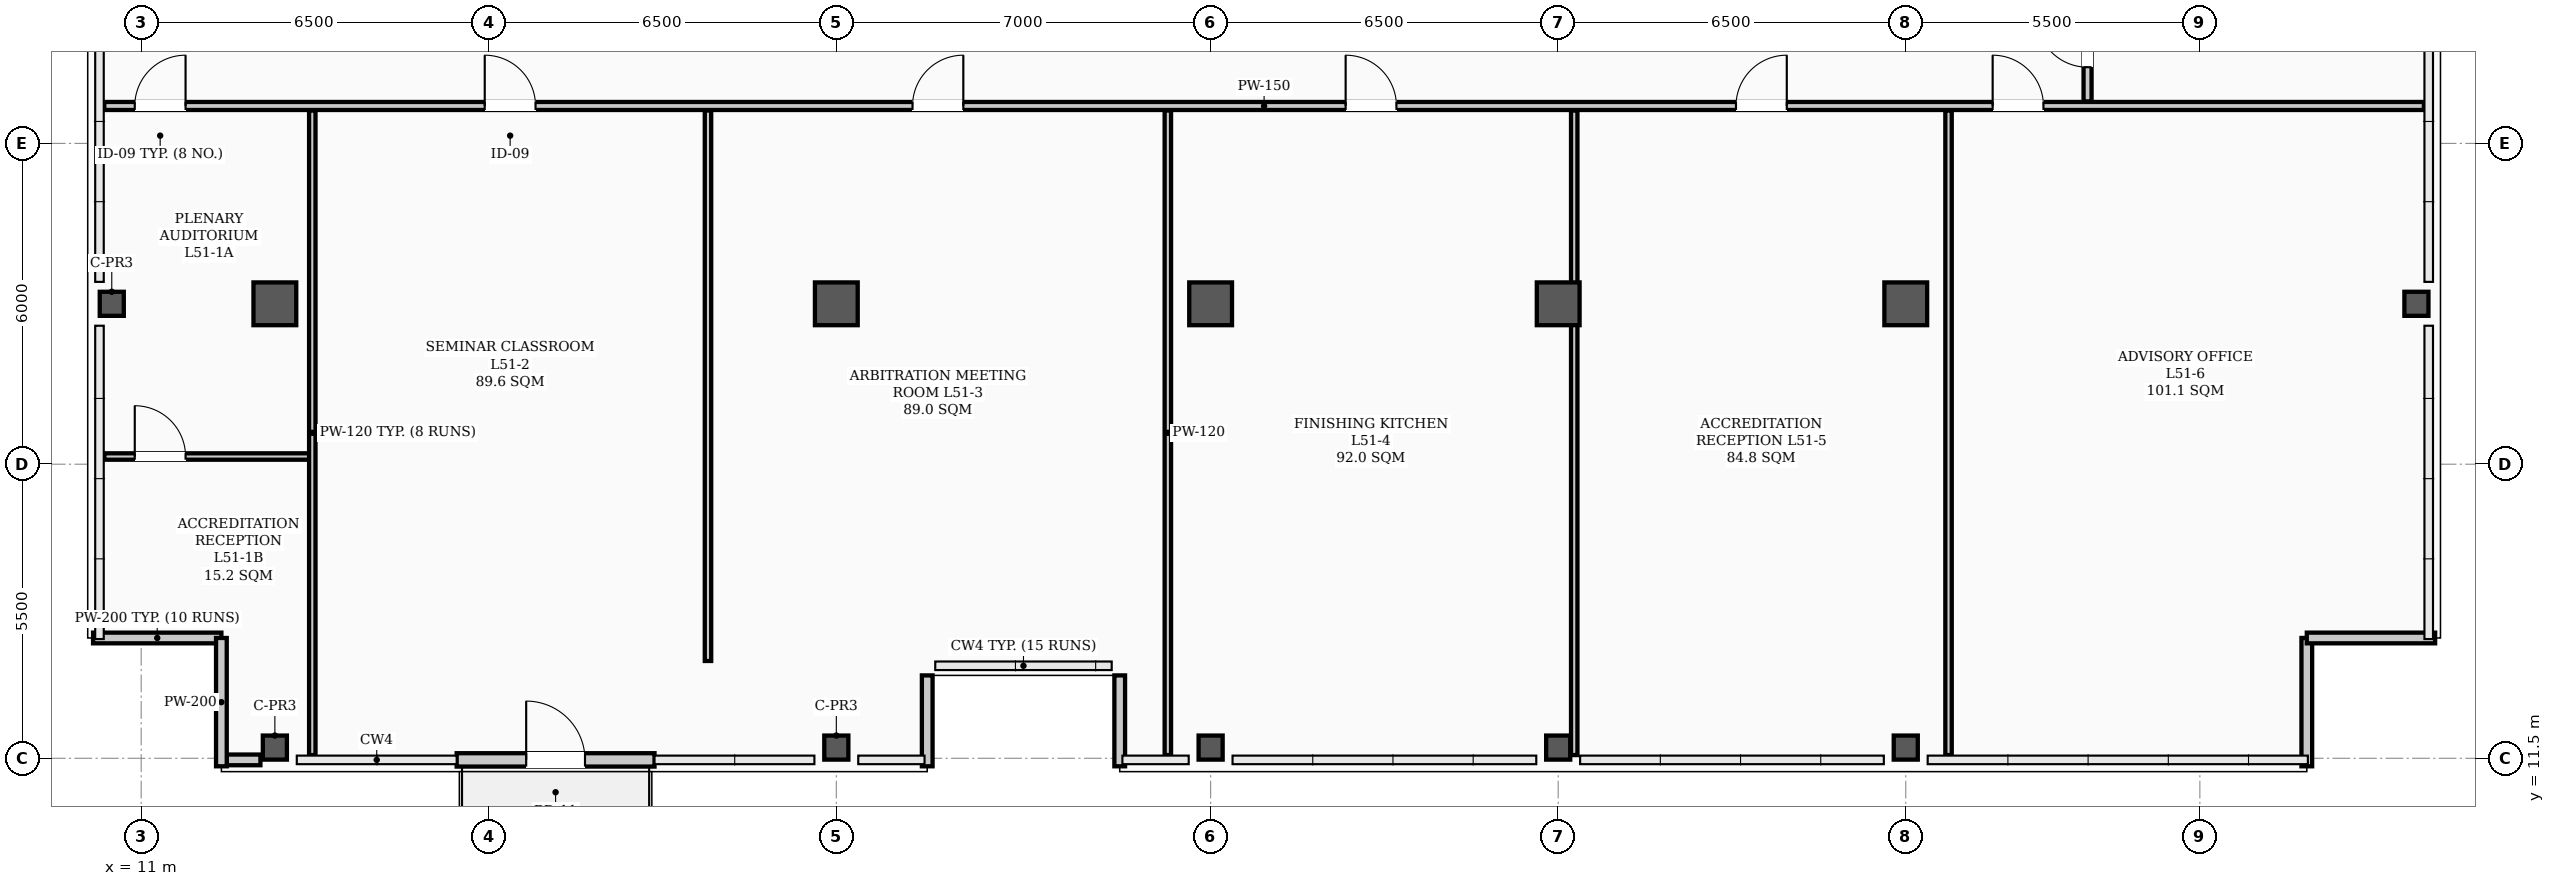
"""IFC4 building model, lengths in metres.
Left out: names, types, materials, properties, quantities, classifications, styles, units other than length and angle.
Written with IfcOpenShell. Run it as: python <this file> out.ifc"""

import sys

from ifc_helpers import new_model, si_unit, direction, frame, frame_2d, origin, origin_2d, place, context, subcontext, project, spatial, rectangle, hollow_rectangle, extrude, element, fill, save


model = new_model("IFC4")
c1 = context("Model", 3, precision=1e-05, world=origin(), true_north=direction((0.0, 1.0)))
c2 = subcontext(c1, "Body", "Model", "MODEL_VIEW")
j1 = project(units=[si_unit("LENGTHUNIT", "METRE"), si_unit("PLANEANGLEUNIT", "RADIAN")], contexts=[c1])
p1 = place(None, origin())
s1 = spatial("IfcSite", under=j1, at=p1, CompositionType="ELEMENT")
p2 = place(p1, origin())
s2 = spatial("IfcBuilding", under=s1, at=p2, CompositionType="ELEMENT")
p3 = place(p2, frame((0.0, 0.0, 206.1)))
s3 = spatial("IfcBuildingStorey", under=s2, at=p3, CompositionType="ELEMENT", Elevation=206.1)
for number, where, z_axis, x_axis in (
    (1, (13.5, 20.0, 0.0), (0.0, 0.0, 1.0), (1.0, 0.0, 0.0)),
    (2, (24.0, 20.0, 0.0), (0.0, 0.0, 1.0), (1.0, 0.0, 0.0)),
    (3, (31.0, 20.0, 0.0), (0.0, 0.0, 1.0), (1.0, 0.0, 0.0)),
    (4, (37.5, 20.0, 0.0), (0.0, 0.0, 1.0), (1.0, 0.0, 0.0)),
    (5, (44.0, 20.0, 0.0), (0.0, 0.0, 1.0), (1.0, 0.0, 0.0)),
):
    element("IfcColumn", number, at=place(p3, frame(where, z_axis=z_axis, x_axis=x_axis)), inside=s3, PredefinedType="COLUMN", context=c2, shape_type="SweptSolid", body=[
        extrude(hollow_rectangle(XDim=0.8, YDim=0.8, WallThickness=0.032, InnerFilletRadius=0.016, OuterFilletRadius=0.048, at=origin_2d()), origin(), (0.0, 0.0, 1.0), 5.0),
    ])
for number, where, z_axis, x_axis in (
    (6, (10.45, 20.0, 0.0), (0.0, 0.0, 1.0), (1.0, 0.0, 0.0)),
    (7, (13.5, 11.7, 0.0), (0.0, 0.0, 1.0), (1.0, 0.0, 0.0)),
    (8, (24.0, 11.7, 0.0), (0.0, 0.0, 1.0), (1.0, 0.0, 0.0)),
    (9, (31.0, 11.7, 0.0), (0.0, 0.0, 1.0), (1.0, 0.0, 0.0)),
    (10, (37.5, 11.7, 0.0), (0.0, 0.0, 1.0), (1.0, 0.0, 0.0)),
    (11, (44.0, 11.7, 0.0), (0.0, 0.0, 1.0), (1.0, 0.0, 0.0)),
    (12, (53.55, 20.0, 0.0), (0.0, 0.0, 1.0), (1.0, 0.0, 0.0)),
):
    element("IfcColumn", number, at=place(p3, frame(where, z_axis=z_axis, x_axis=x_axis)), inside=s3, PredefinedType="COLUMN", context=c2, shape_type="SweptSolid", body=[
        extrude(hollow_rectangle(XDim=0.45, YDim=0.45, WallThickness=0.022, InnerFilletRadius=0.022, OuterFilletRadius=0.044, at=origin_2d()), origin(), (0.0, 0.0, 1.0), 5.0),
    ])
p4 = place(p3, frame((12.6, 11.47, 0.0), z_axis=(0.0, 0.0, 1.0), x_axis=(1.0, 0.0, 0.0)))
e13 = element("IfcWall", 13, at=p4, inside=s3, PredefinedType="PARAPET", context=c2, shape_type="SweptSolid", body=[
    extrude(rectangle(XDim=0.63, YDim=0.2, at=frame_2d((0.315, 0.0))), origin(), (0.0, 0.0, 1.0), 1.2),
])
for number, where, z_axis, x_axis in (
    (14, (10.1, 13.75, 0.0), (0.0, 0.0, 1.0), (1.0, 0.0, 0.0)),
    (15, (12.5, 13.75, 0.0), (0.0, 0.0, 1.0), (0.0, -1.0, 0.0)),
    (16, (51.5, 11.35, 0.0), (0.0, 0.0, 1.0), (0.0, 1.0, 0.0)),
    (17, (51.5, 13.75, 0.0), (0.0, 0.0, 1.0), (1.0, 0.0, 0.0)),
):
    element("IfcWall", number, at=place(p3, frame(where, z_axis=z_axis, x_axis=x_axis)), inside=s3, PredefinedType="PARAPET", context=c2, shape_type="SweptSolid", body=[
        extrude(rectangle(XDim=2.4, YDim=0.2, at=frame_2d((1.2, 0.0))), origin(), (0.0, 0.0, 1.0), 1.2),
    ])
for number, where, z_axis, x_axis in (
    (18, (25.7, 11.35, 0.0), (0.0, 0.0, 1.0), (0.0, 1.0, 0.0)),
    (19, (29.3, 13.05, 0.0), (0.0, 0.0, 1.0), (0.0, -1.0, 0.0)),
):
    element("IfcWall", number, at=place(p3, frame(where, z_axis=z_axis, x_axis=x_axis)), inside=s3, PredefinedType="PARAPET", context=c2, shape_type="SweptSolid", body=[
        extrude(rectangle(XDim=1.7, YDim=0.2, at=frame_2d((0.85, 0.0))), origin(), (0.0, 0.0, 1.0), 1.2),
    ])
p5 = place(p3, frame((16.9, 11.47, 0.0), z_axis=(0.0, 0.0, 1.0), x_axis=(1.0, 0.0, 0.0)))
e20 = element("IfcWall", 20, at=p5, inside=s3, PredefinedType="STANDARD", context=c2, shape_type="SweptSolid", body=[
    extrude(rectangle(XDim=3.7, YDim=0.25, at=frame_2d((1.85, 0.0))), origin(), (0.0, 0.0, 1.0), 4.28),
])
p6 = place(p5, frame((1.3, 0.0, 0.0)))
e21 = element("IfcOpeningElement", 21, at=p6, cuts=e20, PredefinedType="OPENING", context=c2, shape_type="SweptSolid", body=[
    extrude(rectangle(XDim=1.1, YDim=2.2, at=frame_2d((0.55, 1.1))), frame((0.0, 0.135, 0.0), z_axis=(0.0, -1.0, 0.0), x_axis=(1.0, 0.0, 0.0)), (0.0, 0.0, 1.0), 0.27),
])
p7 = place(p3, frame((10.31, 23.7, 0.0), z_axis=(0.0, 0.0, 1.0), x_axis=(1.0, 0.0, 0.0)))
e22 = element("IfcWall", 22, at=p7, inside=s3, PredefinedType="PARTITIONING", context=c2, shape_type="SweptSolid", body=[
    extrude(rectangle(XDim=43.38, YDim=0.15, at=frame_2d((21.69, 0.0))), origin(), (0.0, 0.0, 1.0), 4.3),
])
p8 = place(p7, frame((0.57, 0.0, 0.0)))
e23 = element("IfcOpeningElement", 23, at=p8, cuts=e22, PredefinedType="OPENING", context=c2, shape_type="SweptSolid", body=[
    extrude(rectangle(XDim=0.95, YDim=2.08, at=frame_2d((0.475, 1.04))), frame((0.0, 0.085, 0.0), z_axis=(0.0, -1.0, 0.0), x_axis=(1.0, 0.0, 0.0)), (0.0, 0.0, 1.0), 0.17),
])
p9 = place(p7, frame((7.115, 0.0, 0.0)))
e24 = element("IfcOpeningElement", 24, at=p9, cuts=e22, PredefinedType="OPENING", context=c2, shape_type="SweptSolid", body=[
    extrude(rectangle(XDim=0.95, YDim=2.08, at=frame_2d((0.475, 1.04))), frame((0.0, 0.085, 0.0), z_axis=(0.0, -1.0, 0.0), x_axis=(1.0, 0.0, 0.0)), (0.0, 0.0, 1.0), 0.17),
])
p10 = place(p7, frame((15.115, 0.0, 0.0)))
e25 = element("IfcOpeningElement", 25, at=p10, cuts=e22, PredefinedType="OPENING", context=c2, shape_type="SweptSolid", body=[
    extrude(rectangle(XDim=0.95, YDim=2.08, at=frame_2d((0.475, 1.04))), frame((0.0, 0.085, 0.0), z_axis=(0.0, -1.0, 0.0), x_axis=(1.0, 0.0, 0.0)), (0.0, 0.0, 1.0), 0.17),
])
p11 = place(p7, frame((23.215, 0.0, 0.0)))
e26 = element("IfcOpeningElement", 26, at=p11, cuts=e22, PredefinedType="OPENING", context=c2, shape_type="SweptSolid", body=[
    extrude(rectangle(XDim=0.95, YDim=2.08, at=frame_2d((0.475, 1.04))), frame((0.0, 0.085, 0.0), z_axis=(0.0, -1.0, 0.0), x_axis=(1.0, 0.0, 0.0)), (0.0, 0.0, 1.0), 0.17),
])
p12 = place(p7, frame((30.515, 0.0, 0.0)))
e27 = element("IfcOpeningElement", 27, at=p12, cuts=e22, PredefinedType="OPENING", context=c2, shape_type="SweptSolid", body=[
    extrude(rectangle(XDim=0.95, YDim=2.08, at=frame_2d((0.475, 1.04))), frame((0.0, 0.085, 0.0), z_axis=(0.0, -1.0, 0.0), x_axis=(1.0, 0.0, 0.0)), (0.0, 0.0, 1.0), 0.17),
])
p13 = place(p7, frame((35.315, 0.0, 0.0)))
e28 = element("IfcOpeningElement", 28, at=p13, cuts=e22, PredefinedType="OPENING", context=c2, shape_type="SweptSolid", body=[
    extrude(rectangle(XDim=0.95, YDim=2.08, at=frame_2d((0.475, 1.04))), frame((0.0, 0.085, 0.0), z_axis=(0.0, -1.0, 0.0), x_axis=(1.0, 0.0, 0.0)), (0.0, 0.0, 1.0), 0.17),
])
p14 = place(p3, frame((10.31, 17.144, 0.0), z_axis=(0.0, 0.0, 1.0), x_axis=(1.0, 0.0, 0.0)))
e29 = element("IfcWall", 29, at=p14, inside=s3, PredefinedType="PARTITIONING", context=c2, shape_type="SweptSolid", body=[
    extrude(rectangle(XDim=3.89, YDim=0.12, at=frame_2d((1.945, 0.0))), origin(), (0.0, 0.0, 1.0), 4.3),
])
p15 = place(p14, frame((0.57, 0.0, 0.0)))
e30 = element("IfcOpeningElement", 30, at=p15, cuts=e29, PredefinedType="OPENING", context=c2, shape_type="SweptSolid", body=[
    extrude(rectangle(XDim=0.95, YDim=2.08, at=frame_2d((0.475, 1.04))), frame((0.0, 0.07, 0.0), z_axis=(0.0, -1.0, 0.0), x_axis=(1.0, 0.0, 0.0)), (0.0, 0.0, 1.0), 0.14),
])
p16 = place(p3, frame((47.4, 23.785, 0.0), z_axis=(0.0, 0.0, 1.0), x_axis=(0.0, 1.0, 0.0)))
e31 = element("IfcWall", 31, at=p16, inside=s3, PredefinedType="PARTITIONING", context=c2, shape_type="SweptSolid", body=[
    extrude(rectangle(XDim=13.13, YDim=0.15, at=frame_2d((6.565, 0.0))), origin(), (0.0, 0.0, 1.0), 4.2),
])
p17 = place(p16, frame((0.64, 0.0, 0.0)))
e32 = element("IfcOpeningElement", 32, at=p17, cuts=e31, PredefinedType="OPENING", context=c2, shape_type="SweptSolid", body=[
    extrude(rectangle(XDim=0.95, YDim=2.08, at=frame_2d((0.475, 1.04))), frame((0.0, 0.085, 0.0), z_axis=(0.0, -1.0, 0.0), x_axis=(1.0, 0.0, 0.0)), (0.0, 0.0, 1.0), 0.17),
])
p18 = place(p3, frame((14.2, 11.56, 0.0), z_axis=(0.0, 0.0, 1.0), x_axis=(0.0, 1.0, 0.0)))
e33 = element("IfcWall", 33, at=p18, inside=s3, PredefinedType="PARTITIONING", context=c2, shape_type="SweptSolid", body=[
    extrude(rectangle(XDim=12.055, YDim=0.12, at=frame_2d((6.027, 0.0))), origin(), (0.0, 0.0, 1.0), 4.2),
])
p19 = place(p3, frame((21.6, 13.32, 0.0), z_axis=(0.0, 0.0, 1.0), x_axis=(0.0, 1.0, 0.0)))
e34 = element("IfcWall", 34, at=p19, inside=s3, PredefinedType="PARTITIONING", context=c2, shape_type="SweptSolid", body=[
    extrude(rectangle(XDim=10.295, YDim=0.12, at=frame_2d((5.147, 0.0))), origin(), (0.0, 0.0, 1.0), 4.2),
])
for number, where, z_axis, x_axis in (
    (35, (30.2, 11.56, 0.0), (0.0, 0.0, 1.0), (0.0, 1.0, 0.0)),
    (36, (37.8, 11.56, 0.0), (0.0, 0.0, 1.0), (0.0, 1.0, 0.0)),
    (37, (44.8, 11.56, 0.0), (0.0, 0.0, 1.0), (0.0, 1.0, 0.0)),
):
    element("IfcWall", number, at=place(p3, frame(where, z_axis=z_axis, x_axis=x_axis)), inside=s3, PredefinedType="PARTITIONING", context=c2, shape_type="SweptSolid", body=[
        extrude(rectangle(XDim=12.055, YDim=0.12, at=frame_2d((6.027, 0.0))), origin(), (0.0, 0.0, 1.0), 4.2),
    ])
p20 = place(p6, origin())
e38 = element("IfcDoor", 38, at=p20, inside=s3, OperationType="SINGLE_SWING_LEFT", PredefinedType="DOOR", context=c2, shape_type="SweptSolid", body=[
    extrude(rectangle(XDim=1.1, YDim=2.2, at=frame_2d((0.55, 1.1))), frame((0.0, 0.025, 0.0), z_axis=(0.0, -1.0, 0.0), x_axis=(1.0, 0.0, 0.0)), (0.0, 0.0, 1.0), 0.05),
])
fill(e21, e38)
p21 = place(p15, origin())
e39 = element("IfcDoor", 39, at=p21, inside=s3, OperationType="SINGLE_SWING_LEFT", PredefinedType="DOOR", context=c2, shape_type="SweptSolid", body=[
    extrude(rectangle(XDim=0.95, YDim=2.08, at=frame_2d((0.475, 1.04))), frame((0.0, 0.025, 0.0), z_axis=(0.0, -1.0, 0.0), x_axis=(1.0, 0.0, 0.0)), (0.0, 0.0, 1.0), 0.05),
])
fill(e30, e39)
p22 = place(p8, origin())
e40 = element("IfcDoor", 40, at=p22, inside=s3, OperationType="SINGLE_SWING_RIGHT", PredefinedType="DOOR", context=c2, shape_type="SweptSolid", body=[
    extrude(rectangle(XDim=0.95, YDim=2.08, at=frame_2d((0.475, 1.04))), frame((0.0, 0.025, 0.0), z_axis=(0.0, -1.0, 0.0), x_axis=(1.0, 0.0, 0.0)), (0.0, 0.0, 1.0), 0.05),
])
fill(e23, e40)
p23 = place(p9, origin())
e41 = element("IfcDoor", 41, at=p23, inside=s3, OperationType="SINGLE_SWING_LEFT", PredefinedType="DOOR", context=c2, shape_type="SweptSolid", body=[
    extrude(rectangle(XDim=0.95, YDim=2.08, at=frame_2d((0.475, 1.04))), frame((0.0, 0.025, 0.0), z_axis=(0.0, -1.0, 0.0), x_axis=(1.0, 0.0, 0.0)), (0.0, 0.0, 1.0), 0.05),
])
fill(e24, e41)
p24 = place(p10, origin())
e42 = element("IfcDoor", 42, at=p24, inside=s3, OperationType="SINGLE_SWING_RIGHT", PredefinedType="DOOR", context=c2, shape_type="SweptSolid", body=[
    extrude(rectangle(XDim=0.95, YDim=2.08, at=frame_2d((0.475, 1.04))), frame((0.0, 0.025, 0.0), z_axis=(0.0, -1.0, 0.0), x_axis=(1.0, 0.0, 0.0)), (0.0, 0.0, 1.0), 0.05),
])
fill(e25, e42)
p25 = place(p11, origin())
e43 = element("IfcDoor", 43, at=p25, inside=s3, OperationType="SINGLE_SWING_LEFT", PredefinedType="DOOR", context=c2, shape_type="SweptSolid", body=[
    extrude(rectangle(XDim=0.95, YDim=2.08, at=frame_2d((0.475, 1.04))), frame((0.0, 0.025, 0.0), z_axis=(0.0, -1.0, 0.0), x_axis=(1.0, 0.0, 0.0)), (0.0, 0.0, 1.0), 0.05),
])
fill(e26, e43)
p26 = place(p12, origin())
e44 = element("IfcDoor", 44, at=p26, inside=s3, OperationType="SINGLE_SWING_RIGHT", PredefinedType="DOOR", context=c2, shape_type="SweptSolid", body=[
    extrude(rectangle(XDim=0.95, YDim=2.08, at=frame_2d((0.475, 1.04))), frame((0.0, 0.025, 0.0), z_axis=(0.0, -1.0, 0.0), x_axis=(1.0, 0.0, 0.0)), (0.0, 0.0, 1.0), 0.05),
])
fill(e27, e44)
p27 = place(p13, origin())
e45 = element("IfcDoor", 45, at=p27, inside=s3, OperationType="SINGLE_SWING_LEFT", PredefinedType="DOOR", context=c2, shape_type="SweptSolid", body=[
    extrude(rectangle(XDim=0.95, YDim=2.08, at=frame_2d((0.475, 1.04))), frame((0.0, 0.025, 0.0), z_axis=(0.0, -1.0, 0.0), x_axis=(1.0, 0.0, 0.0)), (0.0, 0.0, 1.0), 0.05),
])
fill(e28, e45)
p28 = place(p17, origin())
e46 = element("IfcDoor", 46, at=p28, inside=s3, OperationType="SINGLE_SWING_RIGHT", PredefinedType="DOOR", context=c2, shape_type="SweptSolid", body=[
    extrude(rectangle(XDim=0.95, YDim=2.08, at=frame_2d((0.475, 1.04))), frame((0.0, 0.025, 0.0), z_axis=(0.0, -1.0, 0.0), x_axis=(1.0, 0.0, 0.0)), (0.0, 0.0, 1.0), 0.05),
])
fill(e32, e46)
save(model, sys.argv[1])
